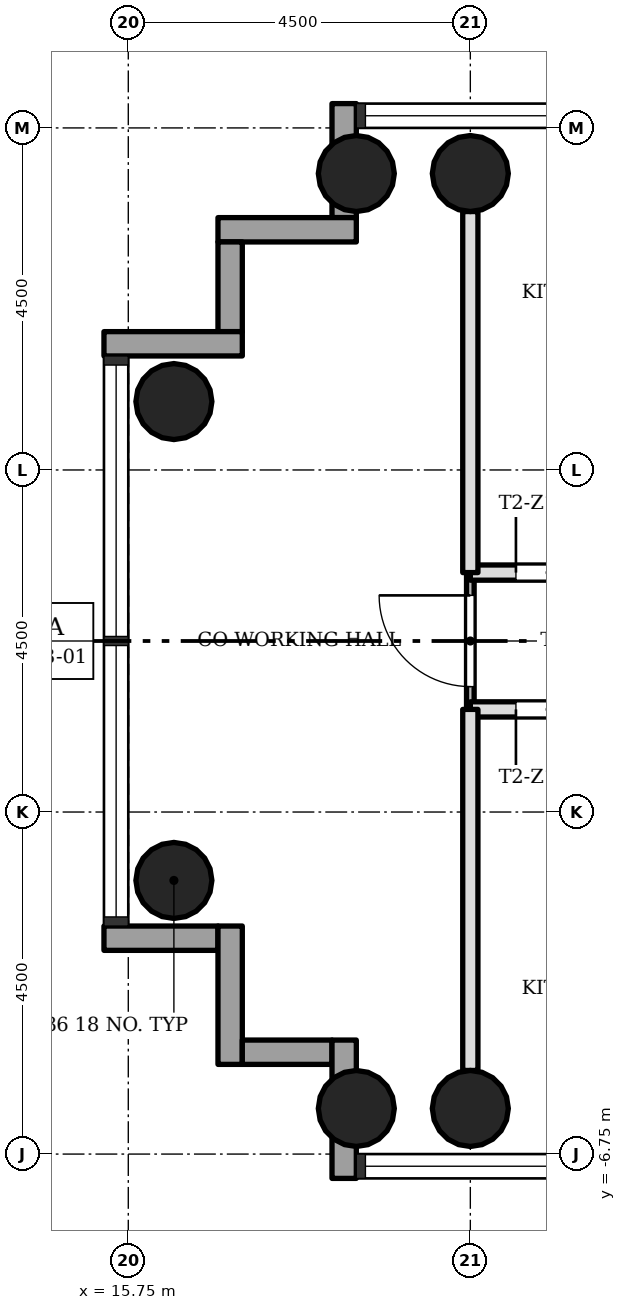
"""IFC4 building model, lengths in metres.
Left out: names, types, materials, properties, quantities, classifications, styles, units other than length and angle.
Written with IfcOpenShell. Run it as: python <this file> out.ifc"""

import sys

from ifc_helpers import new_model, si_unit, direction, frame, frame_2d, origin, origin_2d, place, context, subcontext, project, spatial, rectangle, hollow_circle, extrude, element, fill, save


model = new_model("IFC4")
c1 = context("Model", 3, precision=1e-05, world=origin(), true_north=direction((0.0, 1.0)))
c2 = subcontext(c1, "Body", "Model", "MODEL_VIEW")
j1 = project(units=[si_unit("LENGTHUNIT", "METRE"), si_unit("PLANEANGLEUNIT", "RADIAN")], contexts=[c1])
p1 = place(None, origin())
s1 = spatial("IfcSite", under=j1, at=p1, CompositionType="ELEMENT")
p2 = place(p1, origin())
s2 = spatial("IfcBuilding", under=s1, at=p2, CompositionType="ELEMENT")
p3 = place(p2, frame((0.0, 0.0, 34.7)))
s3 = spatial("IfcBuildingStorey", under=s2, at=p3, CompositionType="ELEMENT", Elevation=34.7)
for number, where, z_axis, x_axis in (
    (1, (20.25, 6.15, 0.0), (0.0, 0.0, 1.0), (1.0, 0.0, 0.0)),
    (2, (20.25, -6.15, 0.0), (0.0, 0.0, 1.0), (1.0, 0.0, 0.0)),
    (3, (18.75, 6.15, 0.0), (0.0, 0.0, 1.0), (1.0, 0.0, 0.0)),
    (4, (18.75, -6.15, 0.0), (0.0, 0.0, 1.0), (1.0, 0.0, 0.0)),
    (5, (16.35, 3.15, 0.0), (0.0, 0.0, 1.0), (1.0, 0.0, 0.0)),
    (6, (16.35, -3.15, 0.0), (0.0, 0.0, 1.0), (1.0, 0.0, 0.0)),
):
    element("IfcColumn", number, at=place(p3, frame(where, z_axis=z_axis, x_axis=x_axis)), inside=s3, PredefinedType="COLUMN", context=c2, shape_type="SweptSolid", body=[
        extrude(hollow_circle(Radius=0.5, WallThickness=0.036, at=origin_2d()), origin(), (0.0, 0.0, 1.0), 3.4),
    ])
p4 = place(p3, frame((18.59, 7.07, -0.3), z_axis=(0.0, 0.0, 1.0), x_axis=(0.0, -1.0, 0.0)))
e7 = element("IfcWall", 7, at=p4, inside=s3, PredefinedType="STANDARD", context=c2, shape_type="SweptSolid", body=[
    extrude(rectangle(XDim=1.5, YDim=0.32, at=frame_2d((0.75, 0.0))), origin(), (0.0, 0.0, 1.0), 3.4),
])
p5 = place(p3, frame((18.75, 5.41, -0.3), z_axis=(0.0, 0.0, 1.0), x_axis=(-1.0, 0.0, 0.0)))
e8 = element("IfcWall", 8, at=p5, inside=s3, PredefinedType="STANDARD", context=c2, shape_type="SweptSolid", body=[
    extrude(rectangle(XDim=1.82, YDim=0.32, at=frame_2d((0.91, 0.0))), origin(), (0.0, 0.0, 1.0), 3.4),
])
p6 = place(p3, frame((17.09, 5.25, -0.3), z_axis=(0.0, 0.0, 1.0), x_axis=(0.0, -1.0, 0.0)))
e9 = element("IfcWall", 9, at=p6, inside=s3, PredefinedType="STANDARD", context=c2, shape_type="SweptSolid", body=[
    extrude(rectangle(XDim=1.18, YDim=0.32, at=frame_2d((0.59, 0.0))), origin(), (0.0, 0.0, 1.0), 3.4),
])
p7 = place(p3, frame((17.25, 3.91, -0.3), z_axis=(0.0, 0.0, 1.0), x_axis=(-1.0, 0.0, 0.0)))
e10 = element("IfcWall", 10, at=p7, inside=s3, PredefinedType="STANDARD", context=c2, shape_type="SweptSolid", body=[
    extrude(rectangle(XDim=1.82, YDim=0.32, at=frame_2d((0.91, 0.0))), origin(), (0.0, 0.0, 1.0), 3.4),
])
p8 = place(p3, frame((15.43, -3.91, -0.3), z_axis=(0.0, 0.0, 1.0), x_axis=(1.0, 0.0, 0.0)))
e11 = element("IfcWall", 11, at=p8, inside=s3, PredefinedType="STANDARD", context=c2, shape_type="SweptSolid", body=[
    extrude(rectangle(XDim=1.5, YDim=0.32, at=frame_2d((0.75, 0.0))), origin(), (0.0, 0.0, 1.0), 3.4),
])
p9 = place(p3, frame((17.09, -3.75, -0.3), z_axis=(0.0, 0.0, 1.0), x_axis=(0.0, -1.0, 0.0)))
e12 = element("IfcWall", 12, at=p9, inside=s3, PredefinedType="STANDARD", context=c2, shape_type="SweptSolid", body=[
    extrude(rectangle(XDim=1.82, YDim=0.32, at=frame_2d((0.91, 0.0))), origin(), (0.0, 0.0, 1.0), 3.4),
])
p10 = place(p3, frame((17.25, -5.41, -0.3), z_axis=(0.0, 0.0, 1.0), x_axis=(1.0, 0.0, 0.0)))
e13 = element("IfcWall", 13, at=p10, inside=s3, PredefinedType="STANDARD", context=c2, shape_type="SweptSolid", body=[
    extrude(rectangle(XDim=1.18, YDim=0.32, at=frame_2d((0.59, 0.0))), origin(), (0.0, 0.0, 1.0), 3.4),
])
p11 = place(p3, frame((18.59, -5.25, -0.3), z_axis=(0.0, 0.0, 1.0), x_axis=(0.0, -1.0, 0.0)))
e14 = element("IfcWall", 14, at=p11, inside=s3, PredefinedType="STANDARD", context=c2, shape_type="SweptSolid", body=[
    extrude(rectangle(XDim=1.82, YDim=0.32, at=frame_2d((0.91, 0.0))), origin(), (0.0, 0.0, 1.0), 3.4),
])
p12 = place(p3, frame((24.75, -0.9, 0.0), z_axis=(0.0, 0.0, 1.0), x_axis=(-1.0, 0.0, 0.0)))
e15 = element("IfcWall", 15, at=p12, inside=s3, PredefinedType="SOLIDWALL", context=c2, shape_type="SweptSolid", body=[
    extrude(rectangle(XDim=4.5, YDim=0.2, at=frame_2d((2.25, 0.0))), origin(), (0.0, 0.0, 1.0), 3.0),
])
p13 = place(p12, frame((3.0, 0.0, 0.0)))
e16 = element("IfcOpeningElement", 16, at=p13, cuts=e15, PredefinedType="OPENING", context=c2, shape_type="SweptSolid", body=[
    extrude(rectangle(XDim=0.9, YDim=2.1, at=frame_2d((0.45, 1.05))), frame((0.0, 0.11, 0.0), z_axis=(0.0, -1.0, 0.0), x_axis=(1.0, 0.0, 0.0)), (0.0, 0.0, 1.0), 0.22),
])
p14 = place(p3, frame((24.75, 0.9, 0.0), z_axis=(0.0, 0.0, 1.0), x_axis=(-1.0, 0.0, 0.0)))
e17 = element("IfcWall", 17, at=p14, inside=s3, PredefinedType="SOLIDWALL", context=c2, shape_type="SweptSolid", body=[
    extrude(rectangle(XDim=4.5, YDim=0.2, at=frame_2d((2.25, 0.0))), origin(), (0.0, 0.0, 1.0), 3.0),
])
p15 = place(p14, frame((3.0, 0.0, 0.0)))
e18 = element("IfcOpeningElement", 18, at=p15, cuts=e17, PredefinedType="OPENING", context=c2, shape_type="SweptSolid", body=[
    extrude(rectangle(XDim=0.9, YDim=2.1, at=frame_2d((0.45, 1.05))), frame((0.0, 0.11, 0.0), z_axis=(0.0, -1.0, 0.0), x_axis=(1.0, 0.0, 0.0)), (0.0, 0.0, 1.0), 0.22),
])
p16 = place(p3, frame((20.25, -0.9, 0.0), z_axis=(0.0, 0.0, 1.0), x_axis=(0.0, 1.0, 0.0)))
e19 = element("IfcWall", 19, at=p16, inside=s3, PredefinedType="PARTITIONING", context=c2, shape_type="SweptSolid", body=[
    extrude(rectangle(XDim=1.8, YDim=0.1, at=frame_2d((0.9, 0.0))), origin(), (0.0, 0.0, 1.0), 3.0),
])
p17 = place(p16, frame((0.3, 0.0, 0.0)))
e20 = element("IfcOpeningElement", 20, at=p17, cuts=e19, PredefinedType="OPENING", context=c2, shape_type="SweptSolid", body=[
    extrude(rectangle(XDim=1.2, YDim=2.1, at=frame_2d((0.6, 1.05))), frame((0.0, 0.06, 0.0), z_axis=(0.0, -1.0, 0.0), x_axis=(1.0, 0.0, 0.0)), (0.0, 0.0, 1.0), 0.12),
])
for number, where, z_axis, x_axis in (
    (21, (20.25, -5.65, 0.0), (0.0, 0.0, 1.0), (0.0, 1.0, 0.0)),
    (22, (20.25, 0.9, 0.0), (0.0, 0.0, 1.0), (0.0, 1.0, 0.0)),
):
    element("IfcWall", number, at=place(p3, frame(where, z_axis=z_axis, x_axis=x_axis)), inside=s3, PredefinedType="SOLIDWALL", context=c2, shape_type="SweptSolid", body=[
        extrude(rectangle(XDim=4.75, YDim=0.2, at=frame_2d((2.375, 0.0))), origin(), (0.0, 0.0, 1.0), 3.0),
    ])
p18 = place(p13, origin())
e23 = element("IfcDoor", 23, at=p18, inside=s3, OperationType="SINGLE_SWING_LEFT", PredefinedType="DOOR", context=c2, shape_type="SweptSolid", body=[
    extrude(rectangle(XDim=0.9, YDim=2.1, at=frame_2d((0.45, 1.05))), frame((0.0, 0.025, 0.0), z_axis=(0.0, -1.0, 0.0), x_axis=(1.0, 0.0, 0.0)), (0.0, 0.0, 1.0), 0.05),
])
fill(e16, e23)
p19 = place(p15, origin())
e24 = element("IfcDoor", 24, at=p19, inside=s3, OperationType="SINGLE_SWING_RIGHT", PredefinedType="DOOR", context=c2, shape_type="SweptSolid", body=[
    extrude(rectangle(XDim=0.9, YDim=2.1, at=frame_2d((0.45, 1.05))), frame((0.0, 0.025, 0.0), z_axis=(0.0, -1.0, 0.0), x_axis=(1.0, 0.0, 0.0)), (0.0, 0.0, 1.0), 0.05),
])
fill(e18, e24)
p20 = place(p17, origin())
e25 = element("IfcDoor", 25, at=p20, inside=s3, OperationType="SINGLE_SWING_LEFT", PredefinedType="DOOR", context=c2, shape_type="SweptSolid", body=[
    extrude(rectangle(XDim=1.2, YDim=2.1, at=frame_2d((0.6, 1.05))), frame((0.0, 0.025, 0.0), z_axis=(0.0, -1.0, 0.0), x_axis=(1.0, 0.0, 0.0)), (0.0, 0.0, 1.0), 0.05),
])
fill(e20, e25)
save(model, sys.argv[1])
